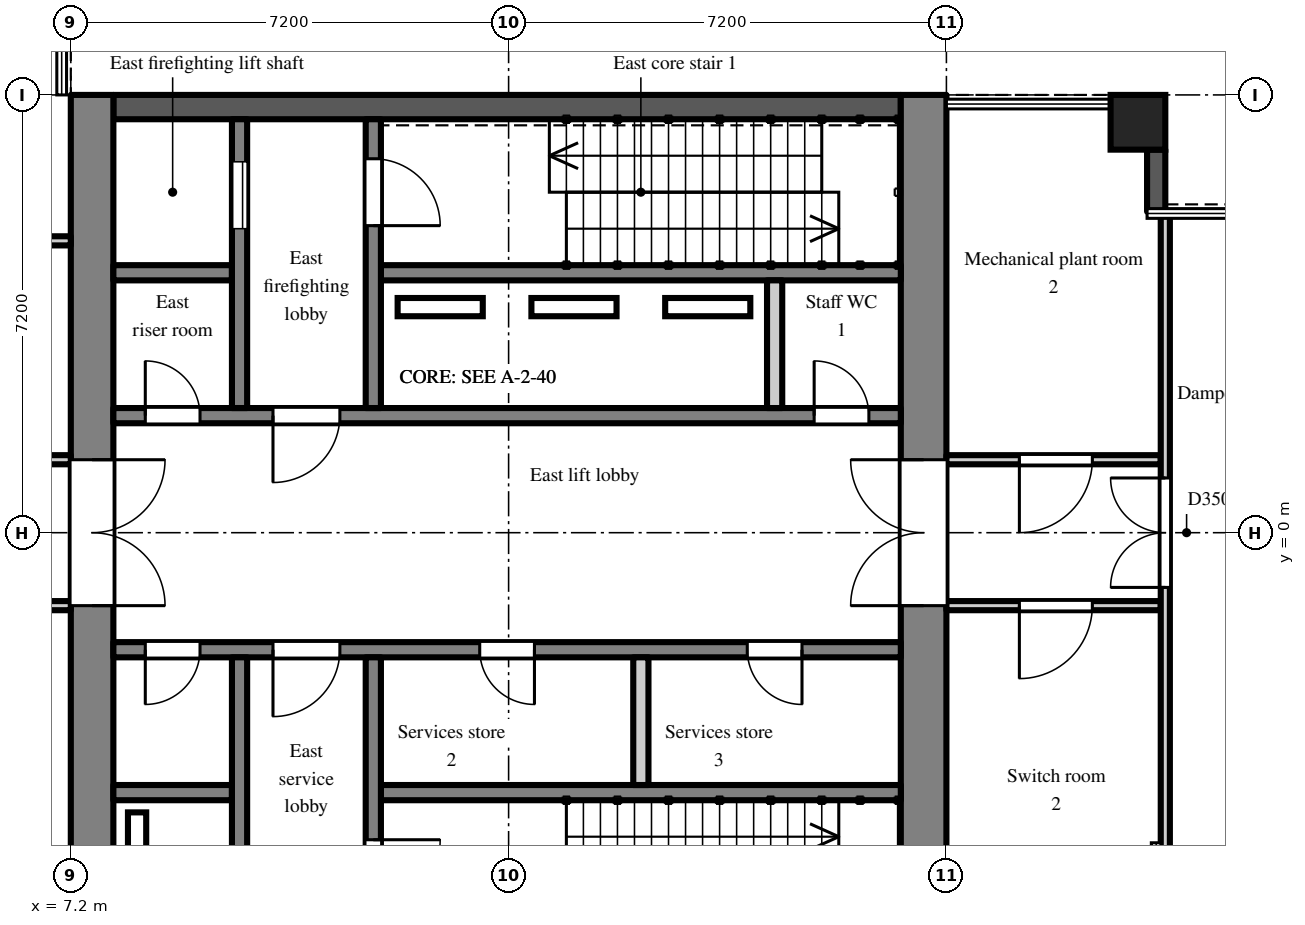
"""IFC4 building model, lengths in metres.
Left out: names, types, materials, properties, quantities, classifications, styles, units other than length and angle.
Written with IfcOpenShell. Run it as: python <this file> out.ifc"""

import sys

from ifc_helpers import new_model, si_unit, direction, frame, frame_2d, origin, origin_2d, place, context, subcontext, project, spatial, rectangle, extrude, element, fill, save


model = new_model("IFC4")
c1 = context("Model", 3, precision=1e-05, world=origin(), true_north=direction((0.0, 1.0)))
c2 = subcontext(c1, "Body", "Model", "MODEL_VIEW")
j1 = project(units=[si_unit("LENGTHUNIT", "METRE"), si_unit("PLANEANGLEUNIT", "RADIAN")], contexts=[c1])
p1 = place(None, origin())
s1 = spatial("IfcSite", under=j1, at=p1, CompositionType="ELEMENT")
p2 = place(p1, origin())
s2 = spatial("IfcBuilding", under=s1, at=p2, CompositionType="ELEMENT")
p3 = place(p2, frame((0.0, 0.0, 242.1)))
s3 = spatial("IfcBuildingStorey", under=s2, at=p3, CompositionType="ELEMENT", Elevation=242.1)
p4 = place(p3, frame((24.75, 6.75, 0.0), z_axis=(0.0, 0.0, 1.0), x_axis=(1.0, 0.0, 0.0)))
e1 = element("IfcColumn", 1, at=p4, inside=s3, PredefinedType="COLUMN", context=c2, shape_type="SweptSolid", body=[
    extrude(rectangle(XDim=0.9, YDim=0.9, at=origin_2d()), origin(), (0.0, 0.0, 1.0), 5.4),
])
p5 = place(p3, frame((25.05, 5.28, 0.0), z_axis=(0.0, 0.0, 1.0), x_axis=(0.0, 1.0, 0.0)))
e2 = element("IfcWall", 2, at=p5, inside=s3, PredefinedType="SOLIDWALL", context=c2, shape_type="SweptSolid", body=[
    extrude(rectangle(XDim=1.02, YDim=0.3, at=frame_2d((0.51, 0.0))), origin(), (0.0, 0.0, 1.0), 4.95),
])
p6 = place(p3, frame((7.55, -7.2, 0.0), z_axis=(0.0, 0.0, 1.0), x_axis=(0.0, 1.0, 0.0)))
e3 = element("IfcWall", 3, at=p6, inside=s3, PredefinedType="SHEAR", context=c2, shape_type="SweptSolid", body=[
    extrude(rectangle(XDim=14.4, YDim=0.7, at=frame_2d((7.2, 0.0))), origin(), (0.0, 0.0, 1.0), 4.95),
])
p7 = place(p6, frame((6.0, 0.0, 0.0)))
e4 = element("IfcOpeningElement", 4, at=p7, cuts=e3, PredefinedType="OPENING", context=c2, shape_type="SweptSolid", body=[
    extrude(rectangle(XDim=2.4, YDim=2.2, at=frame_2d((1.2, 1.1))), frame((0.0, 0.36, 0.0), z_axis=(0.0, -1.0, 0.0), x_axis=(1.0, 0.0, 0.0)), (0.0, 0.0, 1.0), 0.72),
])
p8 = place(p3, frame((21.225, -7.2, 0.0), z_axis=(0.0, 0.0, 1.0), x_axis=(0.0, 1.0, 0.0)))
e5 = element("IfcWall", 5, at=p8, inside=s3, PredefinedType="SHEAR", context=c2, shape_type="SweptSolid", body=[
    extrude(rectangle(XDim=14.4, YDim=0.75, at=frame_2d((7.2, 0.0))), origin(), (0.0, 0.0, 1.0), 4.95),
])
p9 = place(p8, frame((6.0, 0.0, 0.0)))
e6 = element("IfcOpeningElement", 6, at=p9, cuts=e5, PredefinedType="OPENING", context=c2, shape_type="SweptSolid", body=[
    extrude(rectangle(XDim=2.4, YDim=2.2, at=frame_2d((1.2, 1.1))), frame((0.0, 0.385, 0.0), z_axis=(0.0, -1.0, 0.0), x_axis=(1.0, 0.0, 0.0)), (0.0, 0.0, 1.0), 0.77),
])
p10 = place(p3, frame((7.9, 7.0, 0.0), z_axis=(0.0, 0.0, 1.0), x_axis=(1.0, 0.0, 0.0)))
e7 = element("IfcWall", 7, at=p10, inside=s3, PredefinedType="SHEAR", context=c2, shape_type="SweptSolid", body=[
    extrude(rectangle(XDim=12.95, YDim=0.4, at=frame_2d((6.475, 0.0))), origin(), (0.0, 0.0, 1.0), 4.95),
])
p11 = place(p3, frame((7.9, 1.925, 0.0), z_axis=(0.0, 0.0, 1.0), x_axis=(1.0, 0.0, 0.0)))
e8 = element("IfcWall", 8, at=p11, inside=s3, PredefinedType="SHEAR", context=c2, shape_type="SweptSolid", body=[
    extrude(rectangle(XDim=12.95, YDim=0.25, at=frame_2d((6.475, 0.0))), origin(), (0.0, 0.0, 1.0), 4.95),
])
p12 = place(p11, frame((0.525, 0.0, 0.0)))
e9 = element("IfcOpeningElement", 9, at=p12, cuts=e8, PredefinedType="OPENING", context=c2, shape_type="SweptSolid", body=[
    extrude(rectangle(XDim=0.9, YDim=2.1, at=frame_2d((0.45, 1.05))), frame((0.0, 0.135, 0.0), z_axis=(0.0, -1.0, 0.0), x_axis=(1.0, 0.0, 0.0)), (0.0, 0.0, 1.0), 0.27),
])
p13 = place(p11, frame((2.625, 0.0, 0.0)))
e10 = element("IfcOpeningElement", 10, at=p13, cuts=e8, PredefinedType="OPENING", context=c2, shape_type="SweptSolid", body=[
    extrude(rectangle(XDim=1.1, YDim=2.1, at=frame_2d((0.55, 1.05))), frame((0.0, 0.135, 0.0), z_axis=(0.0, -1.0, 0.0), x_axis=(1.0, 0.0, 0.0)), (0.0, 0.0, 1.0), 0.27),
])
p14 = place(p11, frame((11.525, 0.0, 0.0)))
e11 = element("IfcOpeningElement", 11, at=p14, cuts=e8, PredefinedType="OPENING", context=c2, shape_type="SweptSolid", body=[
    extrude(rectangle(XDim=0.9, YDim=2.1, at=frame_2d((0.45, 1.05))), frame((0.0, 0.135, 0.0), z_axis=(0.0, -1.0, 0.0), x_axis=(1.0, 0.0, 0.0)), (0.0, 0.0, 1.0), 0.27),
])
p15 = place(p3, frame((7.9, 4.275, 0.0), z_axis=(0.0, 0.0, 1.0), x_axis=(1.0, 0.0, 0.0)))
e12 = element("IfcWall", 12, at=p15, inside=s3, PredefinedType="SHEAR", context=c2, shape_type="SweptSolid", body=[
    extrude(rectangle(XDim=1.95, YDim=0.25, at=frame_2d((0.975, 0.0))), origin(), (0.0, 0.0, 1.0), 4.95),
])
p16 = place(p3, frame((12.3, 4.275, 0.0), z_axis=(0.0, 0.0, 1.0), x_axis=(1.0, 0.0, 0.0)))
e13 = element("IfcWall", 13, at=p16, inside=s3, PredefinedType="SHEAR", context=c2, shape_type="SweptSolid", body=[
    extrude(rectangle(XDim=8.55, YDim=0.25, at=frame_2d((4.275, 0.0))), origin(), (0.0, 0.0, 1.0), 4.95),
])
p17 = place(p3, frame((9.975, 2.05, 0.0), z_axis=(0.0, 0.0, 1.0), x_axis=(0.0, 1.0, 0.0)))
e14 = element("IfcWall", 14, at=p17, inside=s3, PredefinedType="SHEAR", context=c2, shape_type="SweptSolid", body=[
    extrude(rectangle(XDim=4.75, YDim=0.25, at=frame_2d((2.375, 0.0))), origin(), (0.0, 0.0, 1.0), 4.95),
])
p18 = place(p17, frame((2.95, 0.0, 0.0)))
e15 = element("IfcOpeningElement", 15, at=p18, cuts=e14, PredefinedType="OPENING", context=c2, shape_type="SweptSolid", body=[
    extrude(rectangle(XDim=1.1, YDim=2.1, at=frame_2d((0.55, 1.05))), frame((0.0, 0.135, 0.0), z_axis=(0.0, -1.0, 0.0), x_axis=(1.0, 0.0, 0.0)), (0.0, 0.0, 1.0), 0.27),
])
p19 = place(p3, frame((12.175, 2.05, 0.0), z_axis=(0.0, 0.0, 1.0), x_axis=(0.0, 1.0, 0.0)))
e16 = element("IfcWall", 16, at=p19, inside=s3, PredefinedType="SHEAR", context=c2, shape_type="SweptSolid", body=[
    extrude(rectangle(XDim=4.75, YDim=0.25, at=frame_2d((2.375, 0.0))), origin(), (0.0, 0.0, 1.0), 4.95),
])
p20 = place(p19, frame((3.0, 0.0, 0.0)))
e17 = element("IfcOpeningElement", 17, at=p20, cuts=e16, PredefinedType="OPENING", context=c2, shape_type="SweptSolid", body=[
    extrude(rectangle(XDim=1.1, YDim=2.1, at=frame_2d((0.55, 1.05))), frame((0.0, 0.135, 0.0), z_axis=(0.0, -1.0, 0.0), x_axis=(1.0, 0.0, 0.0)), (0.0, 0.0, 1.0), 0.27),
])
p21 = place(p3, frame((18.775, 2.05, 0.0), z_axis=(0.0, 0.0, 1.0), x_axis=(0.0, 1.0, 0.0)))
e18 = element("IfcWall", 18, at=p21, inside=s3, PredefinedType="PARTITIONING", context=c2, shape_type="SweptSolid", body=[
    extrude(rectangle(XDim=2.1, YDim=0.25, at=frame_2d((1.05, 0.0))), origin(), (0.0, 0.0, 1.0), 4.95),
])
p22 = place(p3, frame((7.9, -1.925, 0.0), z_axis=(0.0, 0.0, 1.0), x_axis=(1.0, 0.0, 0.0)))
e19 = element("IfcWall", 19, at=p22, inside=s3, PredefinedType="SHEAR", context=c2, shape_type="SweptSolid", body=[
    extrude(rectangle(XDim=12.95, YDim=0.25, at=frame_2d((6.475, 0.0))), origin(), (0.0, 0.0, 1.0), 4.95),
])
p23 = place(p22, frame((0.525, 0.0, 0.0)))
e20 = element("IfcOpeningElement", 20, at=p23, cuts=e19, PredefinedType="OPENING", context=c2, shape_type="SweptSolid", body=[
    extrude(rectangle(XDim=0.9, YDim=2.1, at=frame_2d((0.45, 1.05))), frame((0.0, 0.135, 0.0), z_axis=(0.0, -1.0, 0.0), x_axis=(1.0, 0.0, 0.0)), (0.0, 0.0, 1.0), 0.27),
])
p24 = place(p22, frame((2.625, 0.0, 0.0)))
e21 = element("IfcOpeningElement", 21, at=p24, cuts=e19, PredefinedType="OPENING", context=c2, shape_type="SweptSolid", body=[
    extrude(rectangle(XDim=1.1, YDim=2.1, at=frame_2d((0.55, 1.05))), frame((0.0, 0.135, 0.0), z_axis=(0.0, -1.0, 0.0), x_axis=(1.0, 0.0, 0.0)), (0.0, 0.0, 1.0), 0.27),
])
p25 = place(p22, frame((6.025, 0.0, 0.0)))
e22 = element("IfcOpeningElement", 22, at=p25, cuts=e19, PredefinedType="OPENING", context=c2, shape_type="SweptSolid", body=[
    extrude(rectangle(XDim=0.9, YDim=2.1, at=frame_2d((0.45, 1.05))), frame((0.0, 0.135, 0.0), z_axis=(0.0, -1.0, 0.0), x_axis=(1.0, 0.0, 0.0)), (0.0, 0.0, 1.0), 0.27),
])
p26 = place(p22, frame((10.425, 0.0, 0.0)))
e23 = element("IfcOpeningElement", 23, at=p26, cuts=e19, PredefinedType="OPENING", context=c2, shape_type="SweptSolid", body=[
    extrude(rectangle(XDim=0.9, YDim=2.1, at=frame_2d((0.45, 1.05))), frame((0.0, 0.135, 0.0), z_axis=(0.0, -1.0, 0.0), x_axis=(1.0, 0.0, 0.0)), (0.0, 0.0, 1.0), 0.27),
])
p27 = place(p3, frame((7.9, -4.275, 0.0), z_axis=(0.0, 0.0, 1.0), x_axis=(1.0, 0.0, 0.0)))
e24 = element("IfcWall", 24, at=p27, inside=s3, PredefinedType="SHEAR", context=c2, shape_type="SweptSolid", body=[
    extrude(rectangle(XDim=1.95, YDim=0.25, at=frame_2d((0.975, 0.0))), origin(), (0.0, 0.0, 1.0), 4.95),
])
p28 = place(p3, frame((12.3, -4.275, 0.0), z_axis=(0.0, 0.0, 1.0), x_axis=(1.0, 0.0, 0.0)))
e25 = element("IfcWall", 25, at=p28, inside=s3, PredefinedType="SHEAR", context=c2, shape_type="SweptSolid", body=[
    extrude(rectangle(XDim=8.55, YDim=0.25, at=frame_2d((4.275, 0.0))), origin(), (0.0, 0.0, 1.0), 4.95),
])
p29 = place(p3, frame((9.975, -2.05, 0.0), z_axis=(0.0, 0.0, 1.0), x_axis=(0.0, -1.0, 0.0)))
e26 = element("IfcWall", 26, at=p29, inside=s3, PredefinedType="SHEAR", context=c2, shape_type="SweptSolid", body=[
    extrude(rectangle(XDim=4.75, YDim=0.25, at=frame_2d((2.375, 0.0))), origin(), (0.0, 0.0, 1.0), 4.95),
])
p30 = place(p3, frame((12.175, -2.05, 0.0), z_axis=(0.0, 0.0, 1.0), x_axis=(0.0, -1.0, 0.0)))
e27 = element("IfcWall", 27, at=p30, inside=s3, PredefinedType="SHEAR", context=c2, shape_type="SweptSolid", body=[
    extrude(rectangle(XDim=4.75, YDim=0.25, at=frame_2d((2.375, 0.0))), origin(), (0.0, 0.0, 1.0), 4.95),
])
p31 = place(p30, frame((3.0, 0.0, 0.0)))
e28 = element("IfcOpeningElement", 28, at=p31, cuts=e27, PredefinedType="OPENING", context=c2, shape_type="SweptSolid", body=[
    extrude(rectangle(XDim=1.1, YDim=2.1, at=frame_2d((0.55, 1.05))), frame((0.0, 0.135, 0.0), z_axis=(0.0, -1.0, 0.0), x_axis=(1.0, 0.0, 0.0)), (0.0, 0.0, 1.0), 0.27),
])
p32 = place(p3, frame((16.575, -2.05, 0.0), z_axis=(0.0, 0.0, 1.0), x_axis=(0.0, -1.0, 0.0)))
e29 = element("IfcWall", 29, at=p32, inside=s3, PredefinedType="PARTITIONING", context=c2, shape_type="SweptSolid", body=[
    extrude(rectangle(XDim=2.1, YDim=0.25, at=frame_2d((1.05, 0.0))), origin(), (0.0, 0.0, 1.0), 4.95),
])
p33 = place(p3, frame((-7.2, 1.2, 0.0), z_axis=(0.0, 0.0, 1.0), x_axis=(1.0, 0.0, 0.0)))
e30 = element("IfcWall", 30, at=p33, inside=s3, PredefinedType="PARTITIONING", context=c2, shape_type="SweptSolid", body=[
    extrude(rectangle(XDim=14.4, YDim=0.15, at=frame_2d((7.2, 0.0))), origin(), (0.0, 0.0, 1.0), 4.95),
])
p34 = place(p33, frame((6.3, 0.0, 0.0)))
e31 = element("IfcOpeningElement", 31, at=p34, cuts=e30, PredefinedType="OPENING", context=c2, shape_type="SweptSolid", body=[
    extrude(rectangle(XDim=1.8, YDim=2.1, at=frame_2d((0.9, 1.05))), frame((0.0, 0.085, 0.0), z_axis=(0.0, -1.0, 0.0), x_axis=(1.0, 0.0, 0.0)), (0.0, 0.0, 1.0), 0.17),
])
p35 = place(p3, frame((-7.2, 4.8, 0.0), z_axis=(0.0, 0.0, 1.0), x_axis=(1.0, 0.0, 0.0)))
e32 = element("IfcWall", 32, at=p35, inside=s3, PredefinedType="PARTITIONING", context=c2, shape_type="SweptSolid", body=[
    extrude(rectangle(XDim=14.4, YDim=0.15, at=frame_2d((7.2, 0.0))), origin(), (0.0, 0.0, 1.0), 4.95),
])
p36 = place(p35, frame((6.3, 0.0, 0.0)))
e33 = element("IfcOpeningElement", 33, at=p36, cuts=e32, PredefinedType="OPENING", context=c2, shape_type="SweptSolid", body=[
    extrude(rectangle(XDim=1.8, YDim=2.1, at=frame_2d((0.9, 1.05))), frame((0.0, 0.085, 0.0), z_axis=(0.0, -1.0, 0.0), x_axis=(1.0, 0.0, 0.0)), (0.0, 0.0, 1.0), 0.17),
])
p37 = place(p3, frame((1.275, -1.2, 0.0), z_axis=(0.0, 0.0, 1.0), x_axis=(1.0, 0.0, 0.0)))
e34 = element("IfcWall", 34, at=p37, inside=s3, PredefinedType="PARTITIONING", context=c2, shape_type="SweptSolid", body=[
    extrude(rectangle(XDim=5.925, YDim=0.15, at=frame_2d((2.962, 0.0))), origin(), (0.0, 0.0, 1.0), 4.95),
])
p38 = place(p37, frame((0.1, 0.0, 0.0)))
e35 = element("IfcOpeningElement", 35, at=p38, cuts=e34, PredefinedType="OPENING", context=c2, shape_type="SweptSolid", body=[
    extrude(rectangle(XDim=1.8, YDim=2.1, at=frame_2d((0.9, 1.05))), frame((0.0, 0.085, 0.0), z_axis=(0.0, -1.0, 0.0), x_axis=(1.0, 0.0, 0.0)), (0.0, 0.0, 1.0), 0.17),
])
p39 = place(p3, frame((21.6, -1.2, 0.0), z_axis=(0.0, 0.0, 1.0), x_axis=(1.0, 0.0, 0.0)))
e36 = element("IfcWall", 36, at=p39, inside=s3, PredefinedType="PARTITIONING", context=c2, shape_type="SweptSolid", body=[
    extrude(rectangle(XDim=3.525, YDim=0.15, at=frame_2d((1.762, 0.0))), origin(), (0.0, 0.0, 1.0), 4.95),
])
p40 = place(p39, frame((1.2, 0.0, 0.0)))
e37 = element("IfcOpeningElement", 37, at=p40, cuts=e36, PredefinedType="OPENING", context=c2, shape_type="SweptSolid", body=[
    extrude(rectangle(XDim=1.2, YDim=2.1, at=frame_2d((0.6, 1.05))), frame((0.0, 0.085, 0.0), z_axis=(0.0, -1.0, 0.0), x_axis=(1.0, 0.0, 0.0)), (0.0, 0.0, 1.0), 0.17),
])
p41 = place(p3, frame((21.6, 1.2, 0.0), z_axis=(0.0, 0.0, 1.0), x_axis=(1.0, 0.0, 0.0)))
e38 = element("IfcWall", 38, at=p41, inside=s3, PredefinedType="PARTITIONING", context=c2, shape_type="SweptSolid", body=[
    extrude(rectangle(XDim=3.525, YDim=0.15, at=frame_2d((1.762, 0.0))), origin(), (0.0, 0.0, 1.0), 4.95),
])
p42 = place(p41, frame((1.2, 0.0, 0.0)))
e39 = element("IfcOpeningElement", 39, at=p42, cuts=e38, PredefinedType="OPENING", context=c2, shape_type="SweptSolid", body=[
    extrude(rectangle(XDim=1.2, YDim=2.1, at=frame_2d((0.6, 1.05))), frame((0.0, 0.085, 0.0), z_axis=(0.0, -1.0, 0.0), x_axis=(1.0, 0.0, 0.0)), (0.0, 0.0, 1.0), 0.17),
])
p43 = place(p3, frame((25.2, -5.22, 0.0), z_axis=(0.0, 0.0, 1.0), x_axis=(0.0, 1.0, 0.0)))
e40 = element("IfcWall", 40, at=p43, inside=s3, PredefinedType="PARTITIONING", context=c2, shape_type="SweptSolid", body=[
    extrude(rectangle(XDim=10.44, YDim=0.15, at=frame_2d((5.22, 0.0))), origin(), (0.0, 0.0, 1.0), 4.95),
])
p44 = place(p43, frame((4.32, 0.0, 0.0)))
e41 = element("IfcOpeningElement", 41, at=p44, cuts=e40, PredefinedType="OPENING", context=c2, shape_type="SweptSolid", body=[
    extrude(rectangle(XDim=1.8, YDim=2.1, at=frame_2d((0.9, 1.05))), frame((0.0, 0.085, 0.0), z_axis=(0.0, -1.0, 0.0), x_axis=(1.0, 0.0, 0.0)), (0.0, 0.0, 1.0), 0.17),
])
p45 = place(p18, origin())
e42 = element("IfcDoor", 42, at=p45, inside=s3, OperationType="SLIDING_TO_LEFT", PredefinedType="DOOR", context=c2, shape_type="SweptSolid", body=[
    extrude(rectangle(XDim=1.1, YDim=2.1, at=frame_2d((0.55, 1.05))), frame((0.0, 0.025, 0.0), z_axis=(0.0, -1.0, 0.0), x_axis=(1.0, 0.0, 0.0)), (0.0, 0.0, 1.0), 0.05),
])
fill(e15, e42)
p46 = place(p20, frame((1.1, 0.0, 0.0), z_axis=(0.0, 0.0, 1.0), x_axis=(-1.0, 0.0, 0.0)))
e43 = element("IfcDoor", 43, at=p46, inside=s3, OperationType="SINGLE_SWING_RIGHT", PredefinedType="DOOR", context=c2, shape_type="SweptSolid", body=[
    extrude(rectangle(XDim=1.1, YDim=2.1, at=frame_2d((0.55, 1.05))), frame((0.0, 0.025, 0.0), z_axis=(0.0, -1.0, 0.0), x_axis=(1.0, 0.0, 0.0)), (0.0, 0.0, 1.0), 0.05),
])
fill(e17, e43)
p47 = place(p31, origin())
e44 = element("IfcDoor", 44, at=p47, inside=s3, OperationType="SINGLE_SWING_LEFT", PredefinedType="DOOR", context=c2, shape_type="SweptSolid", body=[
    extrude(rectangle(XDim=1.1, YDim=2.1, at=frame_2d((0.55, 1.05))), frame((0.0, 0.025, 0.0), z_axis=(0.0, -1.0, 0.0), x_axis=(1.0, 0.0, 0.0)), (0.0, 0.0, 1.0), 0.05),
])
fill(e28, e44)
p48 = place(p12, origin())
e45 = element("IfcDoor", 45, at=p48, inside=s3, OperationType="SINGLE_SWING_LEFT", PredefinedType="DOOR", context=c2, shape_type="SweptSolid", body=[
    extrude(rectangle(XDim=0.9, YDim=2.1, at=frame_2d((0.45, 1.05))), frame((0.0, 0.025, 0.0), z_axis=(0.0, -1.0, 0.0), x_axis=(1.0, 0.0, 0.0)), (0.0, 0.0, 1.0), 0.05),
])
fill(e9, e45)
p49 = place(p23, frame((0.9, 0.0, 0.0), z_axis=(0.0, 0.0, 1.0), x_axis=(-1.0, 0.0, 0.0)))
e46 = element("IfcDoor", 46, at=p49, inside=s3, OperationType="SINGLE_SWING_RIGHT", PredefinedType="DOOR", context=c2, shape_type="SweptSolid", body=[
    extrude(rectangle(XDim=0.9, YDim=2.1, at=frame_2d((0.45, 1.05))), frame((0.0, 0.025, 0.0), z_axis=(0.0, -1.0, 0.0), x_axis=(1.0, 0.0, 0.0)), (0.0, 0.0, 1.0), 0.05),
])
fill(e20, e46)
p50 = place(p13, frame((1.1, 0.0, 0.0), z_axis=(0.0, 0.0, 1.0), x_axis=(-1.0, 0.0, 0.0)))
e47 = element("IfcDoor", 47, at=p50, inside=s3, OperationType="SINGLE_SWING_RIGHT", PredefinedType="DOOR", context=c2, shape_type="SweptSolid", body=[
    extrude(rectangle(XDim=1.1, YDim=2.1, at=frame_2d((0.55, 1.05))), frame((0.0, 0.025, 0.0), z_axis=(0.0, -1.0, 0.0), x_axis=(1.0, 0.0, 0.0)), (0.0, 0.0, 1.0), 0.05),
])
fill(e10, e47)
p51 = place(p24, frame((1.1, 0.0, 0.0), z_axis=(0.0, 0.0, 1.0), x_axis=(-1.0, 0.0, 0.0)))
e48 = element("IfcDoor", 48, at=p51, inside=s3, OperationType="SINGLE_SWING_RIGHT", PredefinedType="DOOR", context=c2, shape_type="SweptSolid", body=[
    extrude(rectangle(XDim=1.1, YDim=2.1, at=frame_2d((0.55, 1.05))), frame((0.0, 0.025, 0.0), z_axis=(0.0, -1.0, 0.0), x_axis=(1.0, 0.0, 0.0)), (0.0, 0.0, 1.0), 0.05),
])
fill(e21, e48)
p52 = place(p7, frame((2.4, 0.0, 0.0), z_axis=(0.0, 0.0, 1.0), x_axis=(-1.0, 0.0, 0.0)))
e49 = element("IfcDoor", 49, at=p52, inside=s3, OperationType="DOUBLE_DOOR_DOUBLE_SWING", PredefinedType="DOOR", context=c2, shape_type="SweptSolid", body=[
    extrude(rectangle(XDim=2.4, YDim=2.2, at=frame_2d((1.2, 1.1))), frame((0.0, 0.025, 0.0), z_axis=(0.0, -1.0, 0.0), x_axis=(1.0, 0.0, 0.0)), (0.0, 0.0, 1.0), 0.05),
])
fill(e4, e49)
p53 = place(p9, origin())
e50 = element("IfcDoor", 50, at=p53, inside=s3, OperationType="DOUBLE_DOOR_DOUBLE_SWING", PredefinedType="DOOR", context=c2, shape_type="SweptSolid", body=[
    extrude(rectangle(XDim=2.4, YDim=2.2, at=frame_2d((1.2, 1.1))), frame((0.0, 0.025, 0.0), z_axis=(0.0, -1.0, 0.0), x_axis=(1.0, 0.0, 0.0)), (0.0, 0.0, 1.0), 0.05),
])
fill(e6, e50)
p54 = place(p14, origin())
e51 = element("IfcDoor", 51, at=p54, inside=s3, OperationType="SINGLE_SWING_LEFT", PredefinedType="DOOR", context=c2, shape_type="SweptSolid", body=[
    extrude(rectangle(XDim=0.9, YDim=2.1, at=frame_2d((0.45, 1.05))), frame((0.0, 0.025, 0.0), z_axis=(0.0, -1.0, 0.0), x_axis=(1.0, 0.0, 0.0)), (0.0, 0.0, 1.0), 0.05),
])
fill(e11, e51)
p55 = place(p25, frame((0.9, 0.0, 0.0), z_axis=(0.0, 0.0, 1.0), x_axis=(-1.0, 0.0, 0.0)))
e52 = element("IfcDoor", 52, at=p55, inside=s3, OperationType="SINGLE_SWING_LEFT", PredefinedType="DOOR", context=c2, shape_type="SweptSolid", body=[
    extrude(rectangle(XDim=0.9, YDim=2.1, at=frame_2d((0.45, 1.05))), frame((0.0, 0.025, 0.0), z_axis=(0.0, -1.0, 0.0), x_axis=(1.0, 0.0, 0.0)), (0.0, 0.0, 1.0), 0.05),
])
fill(e22, e52)
p56 = place(p26, frame((0.9, 0.0, 0.0), z_axis=(0.0, 0.0, 1.0), x_axis=(-1.0, 0.0, 0.0)))
e53 = element("IfcDoor", 53, at=p56, inside=s3, OperationType="SINGLE_SWING_LEFT", PredefinedType="DOOR", context=c2, shape_type="SweptSolid", body=[
    extrude(rectangle(XDim=0.9, YDim=2.1, at=frame_2d((0.45, 1.05))), frame((0.0, 0.025, 0.0), z_axis=(0.0, -1.0, 0.0), x_axis=(1.0, 0.0, 0.0)), (0.0, 0.0, 1.0), 0.05),
])
fill(e23, e53)
p57 = place(p44, origin())
e54 = element("IfcDoor", 54, at=p57, inside=s3, OperationType="DOUBLE_DOOR_DOUBLE_SWING", PredefinedType="DOOR", context=c2, shape_type="SweptSolid", body=[
    extrude(rectangle(XDim=1.8, YDim=2.1, at=frame_2d((0.9, 1.05))), frame((0.0, 0.025, 0.0), z_axis=(0.0, -1.0, 0.0), x_axis=(1.0, 0.0, 0.0)), (0.0, 0.0, 1.0), 0.05),
])
fill(e41, e54)
p58 = place(p42, frame((1.2, 0.0, 0.0), z_axis=(0.0, 0.0, 1.0), x_axis=(-1.0, 0.0, 0.0)))
e55 = element("IfcDoor", 55, at=p58, inside=s3, OperationType="SINGLE_SWING_RIGHT", PredefinedType="DOOR", context=c2, shape_type="SweptSolid", body=[
    extrude(rectangle(XDim=1.2, YDim=2.1, at=frame_2d((0.6, 1.05))), frame((0.0, 0.025, 0.0), z_axis=(0.0, -1.0, 0.0), x_axis=(1.0, 0.0, 0.0)), (0.0, 0.0, 1.0), 0.05),
])
fill(e39, e55)
p59 = place(p40, frame((1.2, 0.0, 0.0), z_axis=(0.0, 0.0, 1.0), x_axis=(-1.0, 0.0, 0.0)))
e56 = element("IfcDoor", 56, at=p59, inside=s3, OperationType="SINGLE_SWING_RIGHT", PredefinedType="DOOR", context=c2, shape_type="SweptSolid", body=[
    extrude(rectangle(XDim=1.2, YDim=2.1, at=frame_2d((0.6, 1.05))), frame((0.0, 0.025, 0.0), z_axis=(0.0, -1.0, 0.0), x_axis=(1.0, 0.0, 0.0)), (0.0, 0.0, 1.0), 0.05),
])
fill(e37, e56)
save(model, sys.argv[1])
